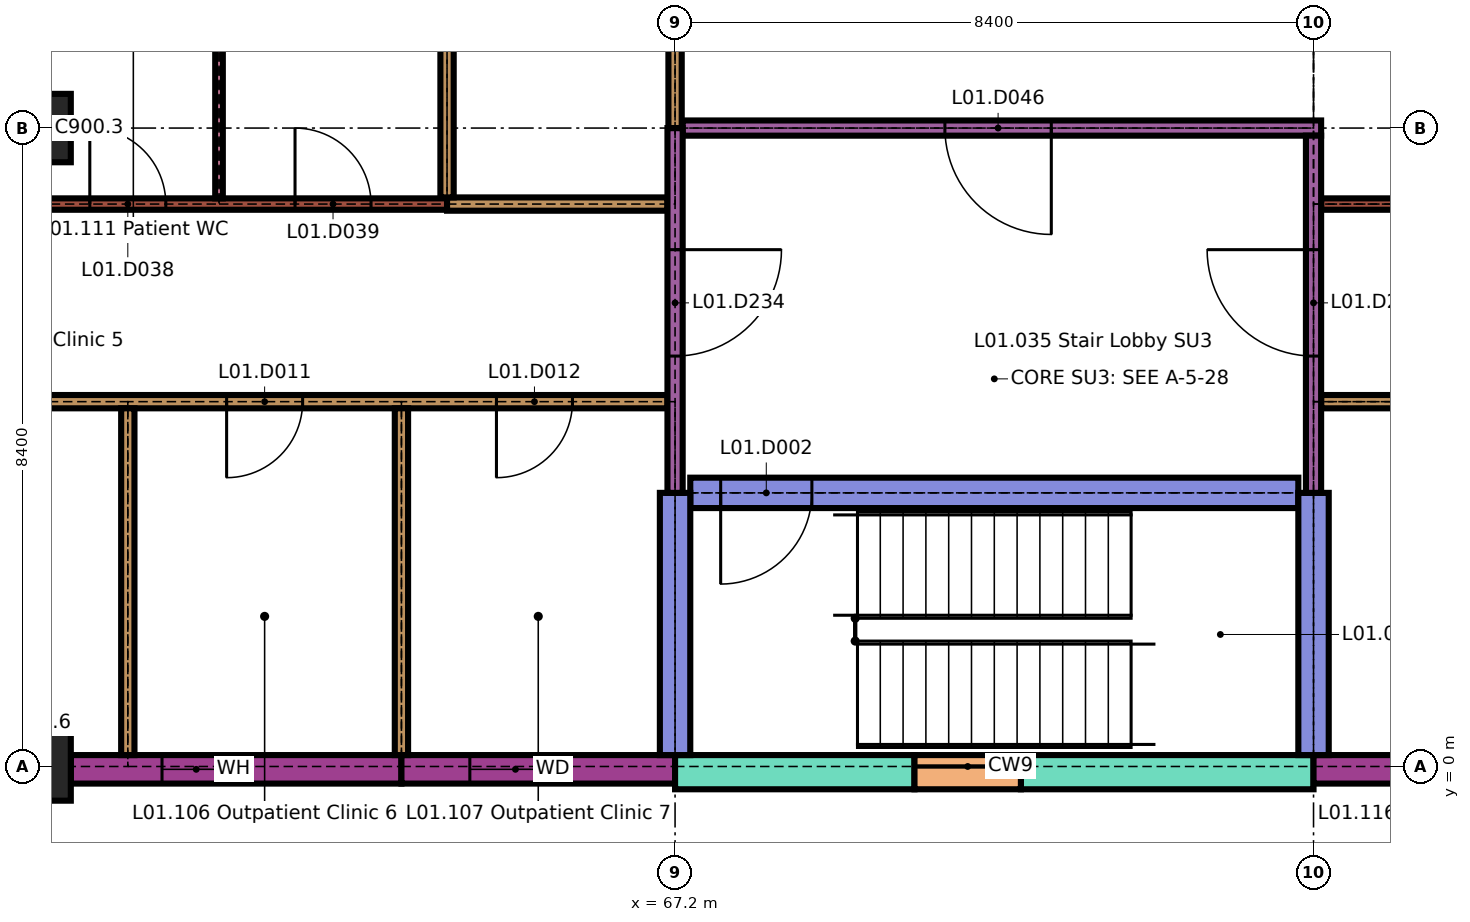
"""IFC4 building model, lengths in metres.
Left out: names, types, materials, properties, quantities, classifications, styles, units other than length and angle.
Written with IfcOpenShell. Run it as: python <this file> out.ifc"""

import sys

from ifc_helpers import new_model, si_unit, direction, frame, frame_2d, origin, origin_2d, place, context, subcontext, project, spatial, rectangle, extrude, element, fill, save


model = new_model("IFC4")
c1 = context("Model", 3, precision=1e-05, world=origin(), true_north=direction((0.0, 1.0)))
c2 = subcontext(c1, "Body", "Model", "MODEL_VIEW")
j1 = project(units=[si_unit("LENGTHUNIT", "METRE"), si_unit("PLANEANGLEUNIT", "RADIAN")], contexts=[c1])
p1 = place(None, origin())
s1 = spatial("IfcSite", under=j1, at=p1, CompositionType="ELEMENT")
p2 = place(p1, origin())
s2 = spatial("IfcBuilding", under=s1, at=p2, CompositionType="ELEMENT")
p3 = place(p2, frame((0.0, 0.0, 4.5)))
s3 = spatial("IfcBuildingStorey", under=s2, at=p3, CompositionType="ELEMENT", Elevation=4.5)
for number, where, z_axis, x_axis in (
    (1, (58.8, 0.0, 0.0), (0.0, 0.0, 1.0), (1.0, 0.0, 0.0)),
    (2, (58.8, 8.4, 0.0), (0.0, 0.0, 1.0), (1.0, 0.0, 0.0)),
):
    element("IfcColumn", number, at=place(p3, frame(where, z_axis=z_axis, x_axis=x_axis)), inside=s3, PredefinedType="COLUMN", context=c2, shape_type="SweptSolid", body=[
        extrude(rectangle(XDim=0.9, YDim=0.9, at=origin_2d()), origin(), (0.0, 0.0, 1.0), 3.45),
    ])
p4 = place(p3, frame((59.25, -0.038, 0.0), z_axis=(0.0, 0.0, 1.0), x_axis=(1.0, 0.0, 0.0)))
e3 = element("IfcWall", 3, at=p4, inside=s3, PredefinedType="SOLIDWALL", context=c2, shape_type="SweptSolid", body=[
    extrude(rectangle(XDim=4.35, YDim=0.375, at=frame_2d((2.175, 0.0))), origin(), (0.0, 0.0, 1.0), 3.15),
])
p5 = place(p4, frame((1.2, 0.0, 0.9)))
e4 = element("IfcOpeningElement", 4, at=p5, cuts=e3, PredefinedType="OPENING", context=c2, shape_type="SweptSolid", body=[
    extrude(rectangle(XDim=0.9, YDim=1.5, at=frame_2d((0.45, 0.75))), frame((0.0, 0.198, 0.0), z_axis=(0.0, -1.0, 0.0), x_axis=(1.0, 0.0, 0.0)), (0.0, 0.0, 1.0), 0.395),
])
p6 = place(p3, frame((63.6, -0.038, 0.0), z_axis=(0.0, 0.0, 1.0), x_axis=(1.0, 0.0, 0.0)))
e5 = element("IfcWall", 5, at=p6, inside=s3, PredefinedType="SOLIDWALL", context=c2, shape_type="SweptSolid", body=[
    extrude(rectangle(XDim=3.6, YDim=0.375, at=frame_2d((1.8, 0.0))), origin(), (0.0, 0.0, 1.0), 3.15),
])
p7 = place(p6, frame((0.9, 0.0, 0.9)))
e6 = element("IfcOpeningElement", 6, at=p7, cuts=e5, PredefinedType="OPENING", context=c2, shape_type="SweptSolid", body=[
    extrude(rectangle(XDim=1.2, YDim=1.5, at=frame_2d((0.6, 0.75))), frame((0.0, 0.198, 0.0), z_axis=(0.0, -1.0, 0.0), x_axis=(1.0, 0.0, 0.0)), (0.0, 0.0, 1.0), 0.395),
])
p8 = place(p3, frame((67.2, -0.075, 0.0), z_axis=(0.0, 0.0, 1.0), x_axis=(1.0, 0.0, 0.0)))
e7 = element("IfcWall", 7, at=p8, inside=s3, PredefinedType="SOLIDWALL", context=c2, shape_type="SweptSolid", body=[
    extrude(rectangle(XDim=3.15, YDim=0.45, at=frame_2d((1.575, 0.0))), origin(), (0.0, 0.0, 1.0), 3.45),
])
p9 = place(p3, frame((71.75, -0.075, 0.0), z_axis=(0.0, 0.0, 1.0), x_axis=(1.0, 0.0, 0.0)))
e8 = element("IfcWall", 8, at=p9, inside=s3, PredefinedType="SOLIDWALL", context=c2, shape_type="SweptSolid", body=[
    extrude(rectangle(XDim=3.85, YDim=0.45, at=frame_2d((1.925, 0.0))), origin(), (0.0, 0.0, 1.0), 3.45),
])
p10 = place(p3, frame((70.35, -0.075, 0.0), z_axis=(0.0, 0.0, 1.0), x_axis=(1.0, 0.0, 0.0)))
e9 = element("IfcWall", 9, at=p10, inside=s3, PredefinedType="SOLIDWALL", context=c2, shape_type="SweptSolid", body=[
    extrude(rectangle(XDim=1.4, YDim=0.45, at=frame_2d((0.7, 0.0))), origin(), (0.0, 0.0, 1.0), 0.6),
])
p11 = place(p3, frame((75.6, -0.038, 0.0), z_axis=(0.0, 0.0, 1.0), x_axis=(1.0, 0.0, 0.0)))
e10 = element("IfcWall", 10, at=p11, inside=s3, PredefinedType="SOLIDWALL", context=c2, shape_type="SweptSolid", body=[
    extrude(rectangle(XDim=3.6, YDim=0.375, at=frame_2d((1.8, 0.0))), origin(), (0.0, 0.0, 1.0), 3.15),
])
p12 = place(p11, frame((1.5, 0.0, 0.9)))
e11 = element("IfcOpeningElement", 11, at=p12, cuts=e10, PredefinedType="OPENING", context=c2, shape_type="SweptSolid", body=[
    extrude(rectangle(XDim=1.2, YDim=1.5, at=frame_2d((0.6, 0.75))), frame((0.0, 0.198, 0.0), z_axis=(0.0, -1.0, 0.0), x_axis=(1.0, 0.0, 0.0)), (0.0, 0.0, 1.0), 0.395),
])
p13 = place(p3, frame((67.4, 3.6, 0.0), z_axis=(0.0, 0.0, 1.0), x_axis=(1.0, 0.0, 0.0)))
e12 = element("IfcWall", 12, at=p13, inside=s3, PredefinedType="SHEAR", context=c2, shape_type="SweptSolid", body=[
    extrude(rectangle(XDim=8.0, YDim=0.4, at=frame_2d((4.0, 0.0))), origin(), (0.0, 0.0, 1.0), 3.45),
])
p14 = place(p13, frame((0.4, 0.0, 0.0)))
e13 = element("IfcOpeningElement", 13, at=p14, cuts=e12, PredefinedType="OPENING", context=c2, shape_type="SweptSolid", body=[
    extrude(rectangle(XDim=1.2, YDim=2.1, at=frame_2d((0.6, 1.05))), frame((0.0, 0.21, 0.0), z_axis=(0.0, -1.0, 0.0), x_axis=(1.0, 0.0, 0.0)), (0.0, 0.0, 1.0), 0.42),
])
p15 = place(p3, frame((42.1, 4.8, 0.0), z_axis=(0.0, 0.0, 1.0), x_axis=(1.0, 0.0, 0.0)))
e14 = element("IfcWall", 14, at=p15, inside=s3, PredefinedType="PARTITIONING", context=c2, shape_type="SweptSolid", body=[
    extrude(rectangle(XDim=25.0, YDim=0.175, at=frame_2d((12.5, 0.0))), origin(), (0.0, 0.0, 1.0), 3.45),
])
p16 = place(p15, frame((1.25, 0.0, 0.0)))
e15 = element("IfcOpeningElement", 15, at=p16, cuts=e14, PredefinedType="OPENING", context=c2, shape_type="SweptSolid", body=[
    extrude(rectangle(XDim=1.0, YDim=2.1, at=frame_2d((0.5, 1.05))), frame((0.0, 0.097, 0.0), z_axis=(0.0, -1.0, 0.0), x_axis=(1.0, 0.0, 0.0)), (0.0, 0.0, 1.0), 0.195),
])
p17 = place(p15, frame((4.8, 0.0, 0.0)))
e16 = element("IfcOpeningElement", 16, at=p17, cuts=e14, PredefinedType="OPENING", context=c2, shape_type="SweptSolid", body=[
    extrude(rectangle(XDim=1.0, YDim=2.1, at=frame_2d((0.5, 1.05))), frame((0.0, 0.097, 0.0), z_axis=(0.0, -1.0, 0.0), x_axis=(1.0, 0.0, 0.0)), (0.0, 0.0, 1.0), 0.195),
])
p18 = place(p15, frame((8.4, 0.0, 0.0)))
e17 = element("IfcOpeningElement", 17, at=p18, cuts=e14, PredefinedType="OPENING", context=c2, shape_type="SweptSolid", body=[
    extrude(rectangle(XDim=1.0, YDim=2.1, at=frame_2d((0.5, 1.05))), frame((0.0, 0.097, 0.0), z_axis=(0.0, -1.0, 0.0), x_axis=(1.0, 0.0, 0.0)), (0.0, 0.0, 1.0), 0.195),
])
p19 = place(p15, frame((12.0, 0.0, 0.0)))
e18 = element("IfcOpeningElement", 18, at=p19, cuts=e14, PredefinedType="OPENING", context=c2, shape_type="SweptSolid", body=[
    extrude(rectangle(XDim=1.0, YDim=2.1, at=frame_2d((0.5, 1.05))), frame((0.0, 0.097, 0.0), z_axis=(0.0, -1.0, 0.0), x_axis=(1.0, 0.0, 0.0)), (0.0, 0.0, 1.0), 0.195),
])
p20 = place(p15, frame((15.6, 0.0, 0.0)))
e19 = element("IfcOpeningElement", 19, at=p20, cuts=e14, PredefinedType="OPENING", context=c2, shape_type="SweptSolid", body=[
    extrude(rectangle(XDim=1.0, YDim=2.1, at=frame_2d((0.5, 1.05))), frame((0.0, 0.097, 0.0), z_axis=(0.0, -1.0, 0.0), x_axis=(1.0, 0.0, 0.0)), (0.0, 0.0, 1.0), 0.195),
])
p21 = place(p15, frame((19.2, 0.0, 0.0)))
e20 = element("IfcOpeningElement", 20, at=p21, cuts=e14, PredefinedType="OPENING", context=c2, shape_type="SweptSolid", body=[
    extrude(rectangle(XDim=1.0, YDim=2.1, at=frame_2d((0.5, 1.05))), frame((0.0, 0.097, 0.0), z_axis=(0.0, -1.0, 0.0), x_axis=(1.0, 0.0, 0.0)), (0.0, 0.0, 1.0), 0.195),
])
p22 = place(p15, frame((22.75, 0.0, 0.0)))
e21 = element("IfcOpeningElement", 21, at=p22, cuts=e14, PredefinedType="OPENING", context=c2, shape_type="SweptSolid", body=[
    extrude(rectangle(XDim=1.0, YDim=2.1, at=frame_2d((0.5, 1.05))), frame((0.0, 0.097, 0.0), z_axis=(0.0, -1.0, 0.0), x_axis=(1.0, 0.0, 0.0)), (0.0, 0.0, 1.0), 0.195),
])
p23 = place(p3, frame((75.7, 4.8, 0.0), z_axis=(0.0, 0.0, 1.0), x_axis=(1.0, 0.0, 0.0)))
e22 = element("IfcWall", 22, at=p23, inside=s3, PredefinedType="PARTITIONING", context=c2, shape_type="SweptSolid", body=[
    extrude(rectangle(XDim=25.0, YDim=0.175, at=frame_2d((12.5, 0.0))), origin(), (0.0, 0.0, 1.0), 3.45),
])
p24 = place(p23, frame((1.25, 0.0, 0.0)))
e23 = element("IfcOpeningElement", 23, at=p24, cuts=e22, PredefinedType="OPENING", context=c2, shape_type="SweptSolid", body=[
    extrude(rectangle(XDim=1.0, YDim=2.1, at=frame_2d((0.5, 1.05))), frame((0.0, 0.097, 0.0), z_axis=(0.0, -1.0, 0.0), x_axis=(1.0, 0.0, 0.0)), (0.0, 0.0, 1.0), 0.195),
])
p25 = place(p23, frame((4.8, 0.0, 0.0)))
e24 = element("IfcOpeningElement", 24, at=p25, cuts=e22, PredefinedType="OPENING", context=c2, shape_type="SweptSolid", body=[
    extrude(rectangle(XDim=1.0, YDim=2.1, at=frame_2d((0.5, 1.05))), frame((0.0, 0.097, 0.0), z_axis=(0.0, -1.0, 0.0), x_axis=(1.0, 0.0, 0.0)), (0.0, 0.0, 1.0), 0.195),
])
p26 = place(p23, frame((8.4, 0.0, 0.0)))
e25 = element("IfcOpeningElement", 25, at=p26, cuts=e22, PredefinedType="OPENING", context=c2, shape_type="SweptSolid", body=[
    extrude(rectangle(XDim=1.0, YDim=2.1, at=frame_2d((0.5, 1.05))), frame((0.0, 0.097, 0.0), z_axis=(0.0, -1.0, 0.0), x_axis=(1.0, 0.0, 0.0)), (0.0, 0.0, 1.0), 0.195),
])
p27 = place(p23, frame((12.0, 0.0, 0.0)))
e26 = element("IfcOpeningElement", 26, at=p27, cuts=e22, PredefinedType="OPENING", context=c2, shape_type="SweptSolid", body=[
    extrude(rectangle(XDim=1.0, YDim=2.1, at=frame_2d((0.5, 1.05))), frame((0.0, 0.097, 0.0), z_axis=(0.0, -1.0, 0.0), x_axis=(1.0, 0.0, 0.0)), (0.0, 0.0, 1.0), 0.195),
])
p28 = place(p23, frame((15.6, 0.0, 0.0)))
e27 = element("IfcOpeningElement", 27, at=p28, cuts=e22, PredefinedType="OPENING", context=c2, shape_type="SweptSolid", body=[
    extrude(rectangle(XDim=1.0, YDim=2.1, at=frame_2d((0.5, 1.05))), frame((0.0, 0.097, 0.0), z_axis=(0.0, -1.0, 0.0), x_axis=(1.0, 0.0, 0.0)), (0.0, 0.0, 1.0), 0.195),
])
p29 = place(p23, frame((19.2, 0.0, 0.0)))
e28 = element("IfcOpeningElement", 28, at=p29, cuts=e22, PredefinedType="OPENING", context=c2, shape_type="SweptSolid", body=[
    extrude(rectangle(XDim=1.0, YDim=2.1, at=frame_2d((0.5, 1.05))), frame((0.0, 0.097, 0.0), z_axis=(0.0, -1.0, 0.0), x_axis=(1.0, 0.0, 0.0)), (0.0, 0.0, 1.0), 0.195),
])
p30 = place(p23, frame((22.75, 0.0, 0.0)))
e29 = element("IfcOpeningElement", 29, at=p30, cuts=e22, PredefinedType="OPENING", context=c2, shape_type="SweptSolid", body=[
    extrude(rectangle(XDim=1.0, YDim=2.1, at=frame_2d((0.5, 1.05))), frame((0.0, 0.097, 0.0), z_axis=(0.0, -1.0, 0.0), x_axis=(1.0, 0.0, 0.0)), (0.0, 0.0, 1.0), 0.195),
])
p31 = place(p3, frame((58.8, 7.4, 0.0), z_axis=(0.0, 0.0, 1.0), x_axis=(1.0, 0.0, 0.0)))
e30 = element("IfcWall", 30, at=p31, inside=s3, PredefinedType="PARTITIONING", context=c2, shape_type="SweptSolid", body=[
    extrude(rectangle(XDim=5.4, YDim=0.15, at=frame_2d((2.7, 0.0))), origin(), (0.0, 0.0, 1.0), 3.45),
])
p32 = place(p31, frame((0.7, 0.0, 0.0)))
e31 = element("IfcOpeningElement", 31, at=p32, cuts=e30, PredefinedType="OPENING", context=c2, shape_type="SweptSolid", body=[
    extrude(rectangle(XDim=1.0, YDim=2.1, at=frame_2d((0.5, 1.05))), frame((0.0, 0.085, 0.0), z_axis=(0.0, -1.0, 0.0), x_axis=(1.0, 0.0, 0.0)), (0.0, 0.0, 1.0), 0.17),
])
p33 = place(p31, frame((3.4, 0.0, 0.0)))
e32 = element("IfcOpeningElement", 32, at=p33, cuts=e30, PredefinedType="OPENING", context=c2, shape_type="SweptSolid", body=[
    extrude(rectangle(XDim=1.0, YDim=2.1, at=frame_2d((0.5, 1.05))), frame((0.0, 0.085, 0.0), z_axis=(0.0, -1.0, 0.0), x_axis=(1.0, 0.0, 0.0)), (0.0, 0.0, 1.0), 0.17),
])
p34 = place(p3, frame((64.2, 7.4, 0.0), z_axis=(0.0, 0.0, 1.0), x_axis=(1.0, 0.0, 0.0)))
e33 = element("IfcWall", 33, at=p34, inside=s3, PredefinedType="PARTITIONING", context=c2, shape_type="SweptSolid", body=[
    extrude(rectangle(XDim=2.9, YDim=0.175, at=frame_2d((1.45, 0.0))), origin(), (0.0, 0.0, 1.0), 3.45),
])
p35 = place(p3, frame((75.7, 7.4, 0.0), z_axis=(0.0, 0.0, 1.0), x_axis=(1.0, 0.0, 0.0)))
e34 = element("IfcWall", 34, at=p35, inside=s3, PredefinedType="PARTITIONING", context=c2, shape_type="SweptSolid", body=[
    extrude(rectangle(XDim=11.1, YDim=0.15, at=frame_2d((5.55, 0.0))), origin(), (0.0, 0.0, 1.0), 3.45),
])
p36 = place(p35, frame((3.45, 0.0, 0.0)))
e35 = element("IfcOpeningElement", 35, at=p36, cuts=e34, PredefinedType="OPENING", context=c2, shape_type="SweptSolid", body=[
    extrude(rectangle(XDim=1.4, YDim=2.1, at=frame_2d((0.7, 1.05))), frame((0.0, 0.085, 0.0), z_axis=(0.0, -1.0, 0.0), x_axis=(1.0, 0.0, 0.0)), (0.0, 0.0, 1.0), 0.17),
])
p37 = place(p3, frame((67.3, 8.4, 0.0), z_axis=(0.0, 0.0, 1.0), x_axis=(1.0, 0.0, 0.0)))
e36 = element("IfcWall", 36, at=p37, inside=s3, PredefinedType="PARTITIONING", context=c2, shape_type="SweptSolid", body=[
    extrude(rectangle(XDim=8.4, YDim=0.2, at=frame_2d((4.2, 0.0))), origin(), (0.0, 0.0, 1.0), 3.45),
])
p38 = place(p37, frame((3.45, 0.0, 0.0)))
e37 = element("IfcOpeningElement", 37, at=p38, cuts=e36, PredefinedType="OPENING", context=c2, shape_type="SweptSolid", body=[
    extrude(rectangle(XDim=1.4, YDim=2.1, at=frame_2d((0.7, 1.05))), frame((0.0, 0.11, 0.0), z_axis=(0.0, -1.0, 0.0), x_axis=(1.0, 0.0, 0.0)), (0.0, 0.0, 1.0), 0.22),
])
p39 = place(p3, frame((60.0, 0.15, 0.0), z_axis=(0.0, 0.0, 1.0), x_axis=(0.0, 1.0, 0.0)))
e38 = element("IfcWall", 38, at=p39, inside=s3, PredefinedType="PARTITIONING", context=c2, shape_type="SweptSolid", body=[
    extrude(rectangle(XDim=4.562, YDim=0.175, at=frame_2d((2.281, 0.0))), origin(), (0.0, 0.0, 1.0), 3.45),
])
p40 = place(p3, frame((61.2, 7.475, 0.0), z_axis=(0.0, 0.0, 1.0), x_axis=(0.0, 1.0, 0.0)))
e39 = element("IfcWall", 39, at=p40, inside=s3, PredefinedType="PARTITIONING", context=c2, shape_type="SweptSolid", body=[
    extrude(rectangle(XDim=3.275, YDim=0.1, at=frame_2d((1.637, 0.0))), origin(), (0.0, 0.0, 1.0), 3.45),
])
p41 = place(p3, frame((63.6, 0.15, 0.0), z_axis=(0.0, 0.0, 1.0), x_axis=(0.0, 1.0, 0.0)))
e40 = element("IfcWall", 40, at=p41, inside=s3, PredefinedType="PARTITIONING", context=c2, shape_type="SweptSolid", body=[
    extrude(rectangle(XDim=4.562, YDim=0.175, at=frame_2d((2.281, 0.0))), origin(), (0.0, 0.0, 1.0), 3.45),
])
p42 = place(p3, frame((64.2, 7.488, 0.0), z_axis=(0.0, 0.0, 1.0), x_axis=(0.0, 1.0, 0.0)))
e41 = element("IfcWall", 41, at=p42, inside=s3, PredefinedType="PARTITIONING", context=c2, shape_type="SweptSolid", body=[
    extrude(rectangle(XDim=6.625, YDim=0.175, at=frame_2d((3.312, 0.0))), origin(), (0.0, 0.0, 1.0), 3.45),
])
p43 = place(p3, frame((67.2, 0.15, 0.0), z_axis=(0.0, 0.0, 1.0), x_axis=(0.0, 1.0, 0.0)))
e42 = element("IfcWall", 42, at=p43, inside=s3, PredefinedType="SHEAR", context=c2, shape_type="SweptSolid", body=[
    extrude(rectangle(XDim=3.45, YDim=0.4, at=frame_2d((1.725, 0.0))), origin(), (0.0, 0.0, 1.0), 3.45),
])
p44 = place(p3, frame((67.2, 3.6, 0.0), z_axis=(0.0, 0.0, 1.0), x_axis=(0.0, 1.0, 0.0)))
e43 = element("IfcWall", 43, at=p44, inside=s3, PredefinedType="PARTITIONING", context=c2, shape_type="SweptSolid", body=[
    extrude(rectangle(XDim=4.8, YDim=0.2, at=frame_2d((2.4, 0.0))), origin(), (0.0, 0.0, 1.0), 3.45),
])
p45 = place(p44, frame((1.8, 0.0, 0.0)))
e44 = element("IfcOpeningElement", 44, at=p45, cuts=e43, PredefinedType="OPENING", context=c2, shape_type="SweptSolid", body=[
    extrude(rectangle(XDim=1.4, YDim=2.1, at=frame_2d((0.7, 1.05))), frame((0.0, 0.11, 0.0), z_axis=(0.0, -1.0, 0.0), x_axis=(1.0, 0.0, 0.0)), (0.0, 0.0, 1.0), 0.22),
])
p46 = place(p3, frame((67.2, 8.4, 0.0), z_axis=(0.0, 0.0, 1.0), x_axis=(0.0, 1.0, 0.0)))
e45 = element("IfcWall", 45, at=p46, inside=s3, PredefinedType="PARTITIONING", context=c2, shape_type="SweptSolid", body=[
    extrude(rectangle(XDim=5.713, YDim=0.175, at=frame_2d((2.856, 0.0))), origin(), (0.0, 0.0, 1.0), 3.45),
])
p47 = place(p3, frame((75.6, 0.15, 0.0), z_axis=(0.0, 0.0, 1.0), x_axis=(0.0, 1.0, 0.0)))
e46 = element("IfcWall", 46, at=p47, inside=s3, PredefinedType="SHEAR", context=c2, shape_type="SweptSolid", body=[
    extrude(rectangle(XDim=3.45, YDim=0.4, at=frame_2d((1.725, 0.0))), origin(), (0.0, 0.0, 1.0), 3.45),
])
p48 = place(p3, frame((75.6, 3.6, 0.0), z_axis=(0.0, 0.0, 1.0), x_axis=(0.0, 1.0, 0.0)))
e47 = element("IfcWall", 47, at=p48, inside=s3, PredefinedType="PARTITIONING", context=c2, shape_type="SweptSolid", body=[
    extrude(rectangle(XDim=4.7, YDim=0.2, at=frame_2d((2.35, 0.0))), origin(), (0.0, 0.0, 1.0), 3.45),
])
p49 = place(p48, frame((1.8, 0.0, 0.0)))
e48 = element("IfcOpeningElement", 48, at=p49, cuts=e47, PredefinedType="OPENING", context=c2, shape_type="SweptSolid", body=[
    extrude(rectangle(XDim=1.4, YDim=2.1, at=frame_2d((0.7, 1.05))), frame((0.0, 0.11, 0.0), z_axis=(0.0, -1.0, 0.0), x_axis=(1.0, 0.0, 0.0)), (0.0, 0.0, 1.0), 0.22),
])
p50 = place(p5, origin())
e49 = element("IfcWindow", 49, at=p50, inside=s3, PartitioningType="SINGLE_PANEL", PredefinedType="WINDOW", context=c2, shape_type="SweptSolid", body=[
    extrude(rectangle(XDim=0.9, YDim=1.5, at=frame_2d((0.45, 0.75))), frame((0.0, 0.03, 0.0), z_axis=(0.0, -1.0, 0.0), x_axis=(1.0, 0.0, 0.0)), (0.0, 0.0, 1.0), 0.06),
])
fill(e4, e49)
p51 = place(p7, origin())
e50 = element("IfcWindow", 50, at=p51, inside=s3, PartitioningType="SINGLE_PANEL", PredefinedType="WINDOW", context=c2, shape_type="SweptSolid", body=[
    extrude(rectangle(XDim=1.2, YDim=1.5, at=frame_2d((0.6, 0.75))), frame((0.0, 0.03, 0.0), z_axis=(0.0, -1.0, 0.0), x_axis=(1.0, 0.0, 0.0)), (0.0, 0.0, 1.0), 0.06),
])
fill(e6, e50)
p52 = place(p14, origin())
e51 = element("IfcDoor", 51, at=p52, inside=s3, OperationType="SINGLE_SWING_LEFT", PredefinedType="DOOR", context=c2, shape_type="SweptSolid", body=[
    extrude(rectangle(XDim=1.2, YDim=2.1, at=frame_2d((0.6, 1.05))), frame((0.0, 0.025, 0.0), z_axis=(0.0, -1.0, 0.0), x_axis=(1.0, 0.0, 0.0)), (0.0, 0.0, 1.0), 0.05),
])
fill(e13, e51)
p53 = place(p21, origin())
e52 = element("IfcDoor", 52, at=p53, inside=s3, OperationType="SINGLE_SWING_LEFT", PredefinedType="DOOR", context=c2, shape_type="SweptSolid", body=[
    extrude(rectangle(XDim=1.0, YDim=2.1, at=frame_2d((0.5, 1.05))), frame((0.0, 0.035, 0.0), z_axis=(0.0, -1.0, 0.0), x_axis=(1.0, 0.0, 0.0)), (0.0, 0.0, 1.0), 0.07),
])
fill(e20, e52)
p54 = place(p22, origin())
e53 = element("IfcDoor", 53, at=p54, inside=s3, OperationType="SINGLE_SWING_LEFT", PredefinedType="DOOR", context=c2, shape_type="SweptSolid", body=[
    extrude(rectangle(XDim=1.0, YDim=2.1, at=frame_2d((0.5, 1.05))), frame((0.0, 0.035, 0.0), z_axis=(0.0, -1.0, 0.0), x_axis=(1.0, 0.0, 0.0)), (0.0, 0.0, 1.0), 0.07),
])
fill(e21, e53)
p55 = place(p32, origin())
e54 = element("IfcDoor", 54, at=p55, inside=s3, OperationType="SINGLE_SWING_RIGHT", PredefinedType="DOOR", context=c2, shape_type="SweptSolid", body=[
    extrude(rectangle(XDim=1.0, YDim=2.1, at=frame_2d((0.5, 1.05))), frame((0.0, 0.025, 0.0), z_axis=(0.0, -1.0, 0.0), x_axis=(1.0, 0.0, 0.0)), (0.0, 0.0, 1.0), 0.05),
])
fill(e31, e54)
p56 = place(p33, origin())
e55 = element("IfcDoor", 55, at=p56, inside=s3, OperationType="SINGLE_SWING_RIGHT", PredefinedType="DOOR", context=c2, shape_type="SweptSolid", body=[
    extrude(rectangle(XDim=1.0, YDim=2.1, at=frame_2d((0.5, 1.05))), frame((0.0, 0.025, 0.0), z_axis=(0.0, -1.0, 0.0), x_axis=(1.0, 0.0, 0.0)), (0.0, 0.0, 1.0), 0.05),
])
fill(e32, e55)
p57 = place(p38, origin())
e56 = element("IfcDoor", 56, at=p57, inside=s3, OperationType="SINGLE_SWING_RIGHT", PredefinedType="DOOR", context=c2, shape_type="SweptSolid", body=[
    extrude(rectangle(XDim=1.4, YDim=2.1, at=frame_2d((0.7, 1.05))), frame((0.0, 0.025, 0.0), z_axis=(0.0, -1.0, 0.0), x_axis=(1.0, 0.0, 0.0)), (0.0, 0.0, 1.0), 0.05),
])
fill(e37, e56)
p58 = place(p45, origin())
e57 = element("IfcDoor", 57, at=p58, inside=s3, OperationType="SINGLE_SWING_RIGHT", PredefinedType="DOOR", context=c2, shape_type="SweptSolid", body=[
    extrude(rectangle(XDim=1.4, YDim=2.1, at=frame_2d((0.7, 1.05))), frame((0.0, 0.03, 0.0), z_axis=(0.0, -1.0, 0.0), x_axis=(1.0, 0.0, 0.0)), (0.0, 0.0, 1.0), 0.06),
])
fill(e44, e57)
p59 = place(p49, origin())
e58 = element("IfcDoor", 58, at=p59, inside=s3, OperationType="SINGLE_SWING_LEFT", PredefinedType="DOOR", context=c2, shape_type="SweptSolid", body=[
    extrude(rectangle(XDim=1.4, YDim=2.1, at=frame_2d((0.7, 1.05))), frame((0.0, 0.03, 0.0), z_axis=(0.0, -1.0, 0.0), x_axis=(1.0, 0.0, 0.0)), (0.0, 0.0, 1.0), 0.06),
])
fill(e48, e58)
save(model, sys.argv[1])
